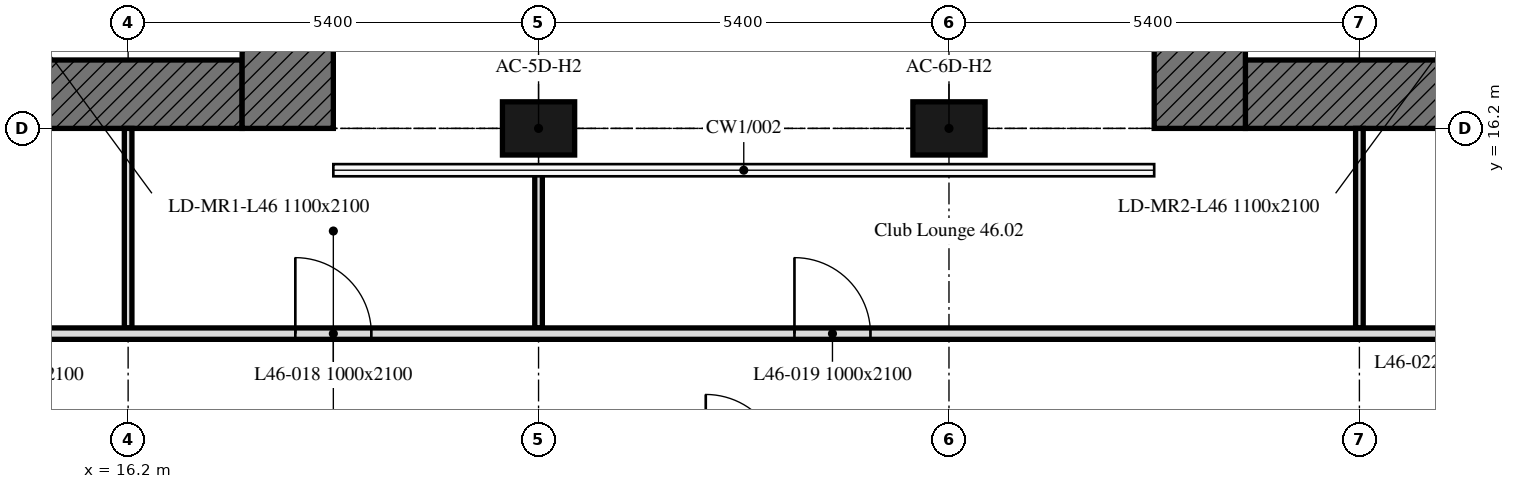
"""IFC4 building model, lengths in metres.
Left out: names, types, materials, properties, quantities, classifications, styles, units other than length and angle.
Written with IfcOpenShell. Run it as: python <this file> out.ifc"""

import sys

from ifc_helpers import new_model, si_unit, direction, frame, frame_2d, origin, origin_2d, place, context, subcontext, project, spatial, rectangle, extrude, element, fill, save


model = new_model("IFC4")
c1 = context("Model", 3, precision=1e-05, world=origin(), true_north=direction((0.0, 1.0)))
c2 = subcontext(c1, "Body", "Model", "MODEL_VIEW")
j1 = project(units=[si_unit("LENGTHUNIT", "METRE"), si_unit("PLANEANGLEUNIT", "RADIAN")], contexts=[c1])
p1 = place(None, origin())
s1 = spatial("IfcSite", under=j1, at=p1, CompositionType="ELEMENT")
p2 = place(p1, origin())
s2 = spatial("IfcBuilding", under=s1, at=p2, CompositionType="ELEMENT")
p3 = place(p2, frame((0.0, 0.0, 190.6)))
s3 = spatial("IfcBuildingStorey", under=s2, at=p3, CompositionType="ELEMENT", Elevation=190.6)
for number, where, z_axis, x_axis in (
    (1, (21.6, 16.2, 0.0), (0.0, 0.0, 1.0), (1.0, 0.0, 0.0)),
    (2, (27.0, 16.2, 0.0), (0.0, 0.0, 1.0), (1.0, 0.0, 0.0)),
):
    element("IfcColumn", number, at=place(p3, frame(where, z_axis=z_axis, x_axis=x_axis)), inside=s3, PredefinedType="COLUMN", context=c2, shape_type="SweptSolid", body=[
        extrude(rectangle(XDim=0.95, YDim=0.7, at=origin_2d()), origin(), (0.0, 0.0, 1.0), 3.0),
    ])
p4 = place(p3, frame((17.7, 16.65, 0.0), z_axis=(0.0, 0.0, 1.0), x_axis=(-1.0, 0.0, 0.0)))
e3 = element("IfcWall", 3, at=p4, inside=s3, PredefinedType="SOLIDWALL", context=c2, shape_type="SweptSolid", body=[
    extrude(rectangle(XDim=11.1, YDim=0.9, at=frame_2d((5.55, 0.0))), origin(), (0.0, 0.0, 1.0), 3.0),
])
p5 = place(p4, frame((5.55, 0.0, 0.0)))
e4 = element("IfcOpeningElement", 4, at=p5, cuts=e3, PredefinedType="OPENING", context=c2, shape_type="SweptSolid", body=[
    extrude(rectangle(XDim=2.0, YDim=2.4, at=frame_2d((1.0, 1.2))), frame((0.0, 0.45, 0.0), z_axis=(0.0, -1.0, 0.0), x_axis=(1.0, 0.0, 0.0)), (0.0, 0.0, 1.0), 0.9),
])
p6 = place(p3, frame((18.3, 32.4, 0.0), z_axis=(0.0, 0.0, 1.0), x_axis=(0.0, -1.0, 0.0)))
e5 = element("IfcWall", 5, at=p6, inside=s3, PredefinedType="SOLIDWALL", context=c2, shape_type="SweptSolid", body=[
    extrude(rectangle(XDim=16.2, YDim=1.2, at=frame_2d((8.1, 0.0))), origin(), (0.0, 0.0, 1.0), 3.0),
])
p7 = place(p3, frame((42.0, 16.65, 0.0), z_axis=(0.0, 0.0, 1.0), x_axis=(-1.0, 0.0, 0.0)))
e6 = element("IfcWall", 6, at=p7, inside=s3, PredefinedType="SOLIDWALL", context=c2, shape_type="SweptSolid", body=[
    extrude(rectangle(XDim=11.1, YDim=0.9, at=frame_2d((5.55, 0.0))), origin(), (0.0, 0.0, 1.0), 3.0),
])
p8 = place(p7, frame((3.55, 0.0, 0.0)))
e7 = element("IfcOpeningElement", 7, at=p8, cuts=e6, PredefinedType="OPENING", context=c2, shape_type="SweptSolid", body=[
    extrude(rectangle(XDim=2.0, YDim=2.4, at=frame_2d((1.0, 1.2))), frame((0.0, 0.45, 0.0), z_axis=(0.0, -1.0, 0.0), x_axis=(1.0, 0.0, 0.0)), (0.0, 0.0, 1.0), 0.9),
])
p9 = place(p3, frame((30.3, 16.2, 0.0), z_axis=(0.0, 0.0, 1.0), x_axis=(0.0, 1.0, 0.0)))
e8 = element("IfcWall", 8, at=p9, inside=s3, PredefinedType="SOLIDWALL", context=c2, shape_type="SweptSolid", body=[
    extrude(rectangle(XDim=16.2, YDim=1.2, at=frame_2d((8.1, 0.0))), origin(), (0.0, 0.0, 1.0), 3.0),
])
p10 = place(p3, frame((16.2, 16.2, 0.0), z_axis=(0.0, 0.0, 1.0), x_axis=(0.0, -1.0, 0.0)))
e9 = element("IfcWall", 9, at=p10, inside=s3, PredefinedType="PARTITIONING", context=c2, shape_type="SweptSolid", body=[
    extrude(rectangle(XDim=2.625, YDim=0.1, at=frame_2d((1.312, 0.0))), origin(), (0.0, 0.0, 1.0), 3.0),
])
p11 = place(p3, frame((21.6, 13.575, 0.0), z_axis=(0.0, 0.0, 1.0), x_axis=(0.0, 1.0, 0.0)))
e10 = element("IfcWall", 10, at=p11, inside=s3, PredefinedType="PARTITIONING", context=c2, shape_type="SweptSolid", body=[
    extrude(rectangle(XDim=2.13, YDim=0.1, at=frame_2d((1.065, 0.0))), origin(), (0.0, 0.0, 1.0), 3.0),
])
p12 = place(p3, frame((32.4, 13.575, 0.0), z_axis=(0.0, 0.0, 1.0), x_axis=(0.0, 1.0, 0.0)))
e11 = element("IfcWall", 11, at=p12, inside=s3, PredefinedType="PARTITIONING", context=c2, shape_type="SweptSolid", body=[
    extrude(rectangle(XDim=2.625, YDim=0.1, at=frame_2d((1.312, 0.0))), origin(), (0.0, 0.0, 1.0), 3.0),
])
p13 = place(p3, frame((9.45, 13.5, 0.0), z_axis=(0.0, 0.0, 1.0), x_axis=(1.0, 0.0, 0.0)))
e12 = element("IfcWall", 12, at=p13, inside=s3, PredefinedType="PARTITIONING", context=c2, shape_type="SweptSolid", body=[
    extrude(rectangle(XDim=33.675, YDim=0.15, at=frame_2d((16.837, 0.0))), origin(), (0.0, 0.0, 1.0), 3.0),
])
p14 = place(p13, frame((8.95, 0.0, 0.0)))
e13 = element("IfcOpeningElement", 13, at=p14, cuts=e12, PredefinedType="OPENING", context=c2, shape_type="SweptSolid", body=[
    extrude(rectangle(XDim=1.0, YDim=2.1, at=frame_2d((0.5, 1.05))), frame((0.0, 0.075, 0.0), z_axis=(0.0, -1.0, 0.0), x_axis=(1.0, 0.0, 0.0)), (0.0, 0.0, 1.0), 0.15),
])
p15 = place(p13, frame((15.517, 0.0, 0.0)))
e14 = element("IfcOpeningElement", 14, at=p15, cuts=e12, PredefinedType="OPENING", context=c2, shape_type="SweptSolid", body=[
    extrude(rectangle(XDim=1.0, YDim=2.1, at=frame_2d((0.5, 1.05))), frame((0.0, 0.075, 0.0), z_axis=(0.0, -1.0, 0.0), x_axis=(1.0, 0.0, 0.0)), (0.0, 0.0, 1.0), 0.15),
])
p16 = place(p13, frame((24.075, 0.0, 0.0)))
e15 = element("IfcOpeningElement", 15, at=p16, cuts=e12, PredefinedType="OPENING", context=c2, shape_type="SweptSolid", body=[
    extrude(rectangle(XDim=1.0, YDim=2.1, at=frame_2d((0.5, 1.05))), frame((0.0, 0.075, 0.0), z_axis=(0.0, -1.0, 0.0), x_axis=(1.0, 0.0, 0.0)), (0.0, 0.0, 1.0), 0.15),
])
p17 = place(p13, frame((31.275, 0.0, 0.0)))
e16 = element("IfcOpeningElement", 16, at=p17, cuts=e12, PredefinedType="OPENING", context=c2, shape_type="SweptSolid", body=[
    extrude(rectangle(XDim=1.0, YDim=2.1, at=frame_2d((0.5, 1.05))), frame((0.0, 0.075, 0.0), z_axis=(0.0, -1.0, 0.0), x_axis=(1.0, 0.0, 0.0)), (0.0, 0.0, 1.0), 0.15),
])
p18 = place(p13, frame((4.625, 0.0, 0.0)))
e17 = element("IfcOpeningElement", 17, at=p18, cuts=e12, PredefinedType="OPENING", context=c2, shape_type="SweptSolid", body=[
    extrude(rectangle(XDim=1.0, YDim=2.1, at=frame_2d((0.5, 1.05))), frame((0.0, 0.075, 0.0), z_axis=(0.0, -1.0, 0.0), x_axis=(1.0, 0.0, 0.0)), (0.0, 0.0, 1.0), 0.15),
])
p19 = place(p13, frame((1.4, 0.0, 0.0)))
e18 = element("IfcOpeningElement", 18, at=p19, cuts=e12, PredefinedType="OPENING", context=c2, shape_type="SweptSolid", body=[
    extrude(rectangle(XDim=1.8, YDim=2.4, at=frame_2d((0.9, 1.2))), frame((0.0, 0.075, 0.0), z_axis=(0.0, -1.0, 0.0), x_axis=(1.0, 0.0, 0.0)), (0.0, 0.0, 1.0), 0.15),
])
p20 = place(p13, frame((26.5, 0.0, 0.0)))
e19 = element("IfcOpeningElement", 19, at=p20, cuts=e12, PredefinedType="OPENING", context=c2, shape_type="SweptSolid", body=[
    extrude(rectangle(XDim=1.8, YDim=2.4, at=frame_2d((0.9, 1.2))), frame((0.0, 0.075, 0.0), z_axis=(0.0, -1.0, 0.0), x_axis=(1.0, 0.0, 0.0)), (0.0, 0.0, 1.0), 0.15),
])
p21 = place(p14, origin())
e20 = element("IfcDoor", 20, at=p21, inside=s3, OperationType="SINGLE_SWING_RIGHT", PredefinedType="DOOR", context=c2, shape_type="SweptSolid", body=[
    extrude(rectangle(XDim=1.0, YDim=2.1, at=frame_2d((0.5, 1.05))), frame((0.0, 0.025, 0.0), z_axis=(0.0, -1.0, 0.0), x_axis=(1.0, 0.0, 0.0)), (0.0, 0.0, 1.0), 0.05),
])
fill(e13, e20)
p22 = place(p15, origin())
e21 = element("IfcDoor", 21, at=p22, inside=s3, OperationType="SINGLE_SWING_RIGHT", PredefinedType="DOOR", context=c2, shape_type="SweptSolid", body=[
    extrude(rectangle(XDim=1.0, YDim=2.1, at=frame_2d((0.5, 1.05))), frame((0.0, 0.025, 0.0), z_axis=(0.0, -1.0, 0.0), x_axis=(1.0, 0.0, 0.0)), (0.0, 0.0, 1.0), 0.05),
])
fill(e14, e21)
save(model, sys.argv[1])
